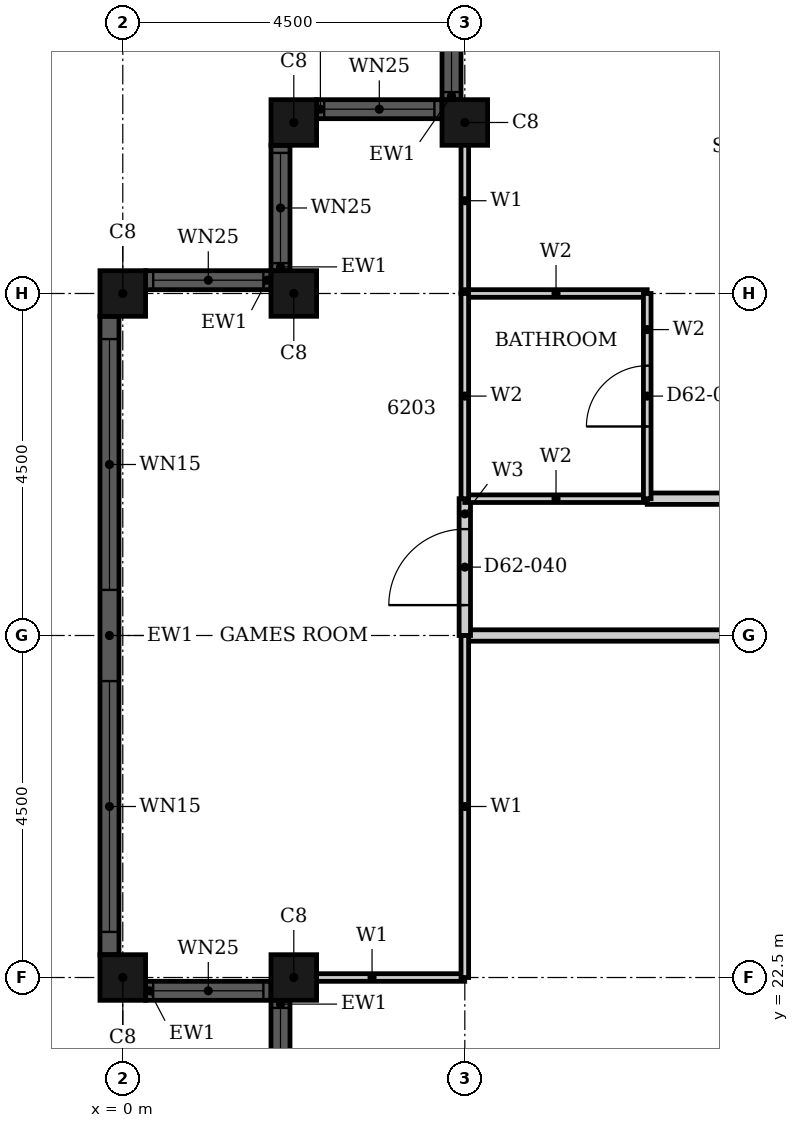
"""IFC4 building model, lengths in metres.
Left out: names, types, materials, properties, quantities, classifications, styles, units other than length and angle.
Written with IfcOpenShell. Run it as: python <this file> out.ifc"""

import sys

from ifc_helpers import new_model, si_unit, direction, frame, frame_2d, origin, origin_2d, place, context, subcontext, project, spatial, rectangle, hollow_rectangle, extrude, element, fill, save


model = new_model("IFC4")
c1 = context("Model", 3, precision=1e-05, world=origin(), true_north=direction((0.0, 1.0)))
c2 = subcontext(c1, "Body", "Model", "MODEL_VIEW")
j1 = project(units=[si_unit("LENGTHUNIT", "METRE"), si_unit("PLANEANGLEUNIT", "RADIAN")], contexts=[c1])
p1 = place(None, origin())
s1 = spatial("IfcSite", under=j1, at=p1, CompositionType="ELEMENT")
p2 = place(p1, origin())
s2 = spatial("IfcBuilding", under=s1, at=p2, CompositionType="ELEMENT")
p3 = place(p2, frame((0.0, 0.0, 245.3)))
s3 = spatial("IfcBuildingStorey", under=s2, at=p3, CompositionType="ELEMENT", Elevation=245.3)
for number, where, z_axis, x_axis in (
    (1, (4.5, 33.75, 0.0), (0.0, 0.0, 1.0), (1.0, 0.0, 0.0)),
    (2, (2.25, 33.75, 0.0), (0.0, 0.0, 1.0), (1.0, 0.0, 0.0)),
    (3, (2.25, 31.5, 0.0), (0.0, 0.0, 1.0), (1.0, 0.0, 0.0)),
    (4, (0.0, 31.5, 0.0), (0.0, 0.0, 1.0), (1.0, 0.0, 0.0)),
    (5, (0.0, 22.5, 0.0), (0.0, 0.0, 1.0), (1.0, 0.0, 0.0)),
    (6, (2.25, 22.5, 0.0), (0.0, 0.0, 1.0), (1.0, 0.0, 0.0)),
):
    element("IfcColumn", number, at=place(p3, frame(where, z_axis=z_axis, x_axis=x_axis)), inside=s3, PredefinedType="COLUMN", context=c2, shape_type="SweptSolid", body=[
        extrude(hollow_rectangle(XDim=0.6, YDim=0.6, WallThickness=0.02, at=origin_2d()), origin(), (0.0, 0.0, 1.0), 3.7),
    ])
p4 = place(p3, frame((4.325, 35.7, 0.0), z_axis=(0.0, 0.0, 1.0), x_axis=(0.0, -1.0, 0.0)))
e7 = element("IfcWall", 7, at=p4, inside=s3, PredefinedType="SOLIDWALL", context=c2, shape_type="SweptSolid", body=[
    extrude(rectangle(XDim=1.65, YDim=0.25, at=frame_2d((0.825, 0.0))), origin(), (0.0, 0.0, 1.0), 3.7),
])
p5 = place(p4, frame((0.1, 0.0, 0.9)))
e8 = element("IfcOpeningElement", 8, at=p5, cuts=e7, PredefinedType="OPENING", context=c2, shape_type="SweptSolid", body=[
    extrude(rectangle(XDim=1.45, YDim=1.85, at=frame_2d((0.725, 0.925))), frame((0.0, 0.135, 0.0), z_axis=(0.0, -1.0, 0.0), x_axis=(1.0, 0.0, 0.0)), (0.0, 0.0, 1.0), 0.27),
])
p6 = place(p3, frame((4.2, 33.925, 0.0), z_axis=(0.0, 0.0, 1.0), x_axis=(-1.0, 0.0, 0.0)))
e9 = element("IfcWall", 9, at=p6, inside=s3, PredefinedType="SOLIDWALL", context=c2, shape_type="SweptSolid", body=[
    extrude(rectangle(XDim=1.65, YDim=0.25, at=frame_2d((0.825, 0.0))), origin(), (0.0, 0.0, 1.0), 3.7),
])
p7 = place(p6, frame((0.1, 0.0, 0.9)))
e10 = element("IfcOpeningElement", 10, at=p7, cuts=e9, PredefinedType="OPENING", context=c2, shape_type="SweptSolid", body=[
    extrude(rectangle(XDim=1.45, YDim=1.85, at=frame_2d((0.725, 0.925))), frame((0.0, 0.135, 0.0), z_axis=(0.0, -1.0, 0.0), x_axis=(1.0, 0.0, 0.0)), (0.0, 0.0, 1.0), 0.27),
])
p8 = place(p3, frame((2.075, 33.45, 0.0), z_axis=(0.0, 0.0, 1.0), x_axis=(0.0, -1.0, 0.0)))
e11 = element("IfcWall", 11, at=p8, inside=s3, PredefinedType="SOLIDWALL", context=c2, shape_type="SweptSolid", body=[
    extrude(rectangle(XDim=1.65, YDim=0.25, at=frame_2d((0.825, 0.0))), origin(), (0.0, 0.0, 1.0), 3.7),
])
p9 = place(p8, frame((0.1, 0.0, 0.9)))
e12 = element("IfcOpeningElement", 12, at=p9, cuts=e11, PredefinedType="OPENING", context=c2, shape_type="SweptSolid", body=[
    extrude(rectangle(XDim=1.45, YDim=1.85, at=frame_2d((0.725, 0.925))), frame((0.0, 0.135, 0.0), z_axis=(0.0, -1.0, 0.0), x_axis=(1.0, 0.0, 0.0)), (0.0, 0.0, 1.0), 0.27),
])
p10 = place(p3, frame((1.95, 31.675, 0.0), z_axis=(0.0, 0.0, 1.0), x_axis=(-1.0, 0.0, 0.0)))
e13 = element("IfcWall", 13, at=p10, inside=s3, PredefinedType="SOLIDWALL", context=c2, shape_type="SweptSolid", body=[
    extrude(rectangle(XDim=1.65, YDim=0.25, at=frame_2d((0.825, 0.0))), origin(), (0.0, 0.0, 1.0), 3.7),
])
p11 = place(p10, frame((0.1, 0.0, 0.9)))
e14 = element("IfcOpeningElement", 14, at=p11, cuts=e13, PredefinedType="OPENING", context=c2, shape_type="SweptSolid", body=[
    extrude(rectangle(XDim=1.45, YDim=1.85, at=frame_2d((0.725, 0.925))), frame((0.0, 0.135, 0.0), z_axis=(0.0, -1.0, 0.0), x_axis=(1.0, 0.0, 0.0)), (0.0, 0.0, 1.0), 0.27),
])
p12 = place(p3, frame((-0.175, 31.2, 0.0), z_axis=(0.0, 0.0, 1.0), x_axis=(0.0, -1.0, 0.0)))
e15 = element("IfcWall", 15, at=p12, inside=s3, PredefinedType="SOLIDWALL", context=c2, shape_type="SweptSolid", body=[
    extrude(rectangle(XDim=8.4, YDim=0.25, at=frame_2d((4.2, 0.0))), origin(), (0.0, 0.0, 1.0), 3.7),
])
p13 = place(p12, frame((0.3, 0.0, 0.45)))
e16 = element("IfcOpeningElement", 16, at=p13, cuts=e15, PredefinedType="OPENING", context=c2, shape_type="SweptSolid", body=[
    extrude(rectangle(XDim=3.3, YDim=2.3, at=frame_2d((1.65, 1.15))), frame((0.0, 0.135, 0.0), z_axis=(0.0, -1.0, 0.0), x_axis=(1.0, 0.0, 0.0)), (0.0, 0.0, 1.0), 0.27),
])
p14 = place(p12, frame((4.8, 0.0, 0.45)))
e17 = element("IfcOpeningElement", 17, at=p14, cuts=e15, PredefinedType="OPENING", context=c2, shape_type="SweptSolid", body=[
    extrude(rectangle(XDim=3.3, YDim=2.3, at=frame_2d((1.65, 1.15))), frame((0.0, 0.135, 0.0), z_axis=(0.0, -1.0, 0.0), x_axis=(1.0, 0.0, 0.0)), (0.0, 0.0, 1.0), 0.27),
])
p15 = place(p3, frame((0.3, 22.325, 0.0), z_axis=(0.0, 0.0, 1.0), x_axis=(1.0, 0.0, 0.0)))
e18 = element("IfcWall", 18, at=p15, inside=s3, PredefinedType="SOLIDWALL", context=c2, shape_type="SweptSolid", body=[
    extrude(rectangle(XDim=1.65, YDim=0.25, at=frame_2d((0.825, 0.0))), origin(), (0.0, 0.0, 1.0), 3.7),
])
p16 = place(p15, frame((0.1, 0.0, 0.9)))
e19 = element("IfcOpeningElement", 19, at=p16, cuts=e18, PredefinedType="OPENING", context=c2, shape_type="SweptSolid", body=[
    extrude(rectangle(XDim=1.45, YDim=1.85, at=frame_2d((0.725, 0.925))), frame((0.0, 0.135, 0.0), z_axis=(0.0, -1.0, 0.0), x_axis=(1.0, 0.0, 0.0)), (0.0, 0.0, 1.0), 0.27),
])
p17 = place(p3, frame((2.075, 22.2, 0.0), z_axis=(0.0, 0.0, 1.0), x_axis=(0.0, -1.0, 0.0)))
e20 = element("IfcWall", 20, at=p17, inside=s3, PredefinedType="SOLIDWALL", context=c2, shape_type="SweptSolid", body=[
    extrude(rectangle(XDim=1.65, YDim=0.25, at=frame_2d((0.825, 0.0))), origin(), (0.0, 0.0, 1.0), 3.7),
])
p18 = place(p17, frame((0.1, 0.0, 0.9)))
e21 = element("IfcOpeningElement", 21, at=p18, cuts=e20, PredefinedType="OPENING", context=c2, shape_type="SweptSolid", body=[
    extrude(rectangle(XDim=1.45, YDim=1.85, at=frame_2d((0.725, 0.925))), frame((0.0, 0.135, 0.0), z_axis=(0.0, -1.0, 0.0), x_axis=(1.0, 0.0, 0.0)), (0.0, 0.0, 1.0), 0.27),
])
p19 = place(p3, frame((4.5, 27.0, 0.0), z_axis=(0.0, 0.0, 1.0), x_axis=(1.0, 0.0, 0.0)))
e22 = element("IfcWall", 22, at=p19, inside=s3, PredefinedType="PARTITIONING", context=c2, shape_type="SweptSolid", body=[
    extrude(rectangle(XDim=13.5, YDim=0.15, at=frame_2d((6.75, 0.0))), origin(), (0.0, 0.0, 1.0), 2.68),
])
p20 = place(p19, frame((5.35, 0.0, 0.0)))
e23 = element("IfcOpeningElement", 23, at=p20, cuts=e22, PredefinedType="OPENING", context=c2, shape_type="SweptSolid", body=[
    extrude(rectangle(XDim=1.0, YDim=2.1, at=frame_2d((0.5, 1.05))), frame((0.0, 0.085, 0.0), z_axis=(0.0, -1.0, 0.0), x_axis=(1.0, 0.0, 0.0)), (0.0, 0.0, 1.0), 0.17),
])
p21 = place(p3, frame((6.9, 28.8, 0.0), z_axis=(0.0, 0.0, 1.0), x_axis=(1.0, 0.0, 0.0)))
e24 = element("IfcWall", 24, at=p21, inside=s3, PredefinedType="PARTITIONING", context=c2, shape_type="SweptSolid", body=[
    extrude(rectangle(XDim=9.299, YDim=0.15, at=frame_2d((4.649, 0.0))), origin(), (0.0, 0.0, 1.0), 3.4),
])
p22 = place(p3, frame((4.5, 27.0, 0.0), z_axis=(0.0, 0.0, 1.0), x_axis=(0.0, 1.0, 0.0)))
e25 = element("IfcWall", 25, at=p22, inside=s3, PredefinedType="PARTITIONING", context=c2, shape_type="SweptSolid", body=[
    extrude(rectangle(XDim=1.8, YDim=0.15, at=frame_2d((0.9, 0.0))), origin(), (0.0, 0.0, 1.0), 3.4),
])
p23 = place(p22, frame((0.4, 0.0, 0.0)))
e26 = element("IfcOpeningElement", 26, at=p23, cuts=e25, PredefinedType="OPENING", context=c2, shape_type="SweptSolid", body=[
    extrude(rectangle(XDim=1.0, YDim=2.1, at=frame_2d((0.5, 1.05))), frame((0.0, 0.085, 0.0), z_axis=(0.0, -1.0, 0.0), x_axis=(1.0, 0.0, 0.0)), (0.0, 0.0, 1.0), 0.17),
])
p24 = place(p3, frame((2.06, 22.5, 0.0), z_axis=(0.0, 0.0, 1.0), x_axis=(1.0, 0.0, 0.0)))
e27 = element("IfcWall", 27, at=p24, inside=s3, PredefinedType="PARTITIONING", context=c2, shape_type="SweptSolid", body=[
    extrude(rectangle(XDim=2.439, YDim=0.1, at=frame_2d((1.219, 0.0))), origin(), (0.0, 0.0, 1.0), 2.68),
])
p25 = place(p3, frame((4.5, 31.501, 0.0), z_axis=(0.0, 0.0, 1.0), x_axis=(0.0, 1.0, 0.0)))
e28 = element("IfcWall", 28, at=p25, inside=s3, PredefinedType="PARTITIONING", context=c2, shape_type="SweptSolid", body=[
    extrude(rectangle(XDim=2.439, YDim=0.1, at=frame_2d((1.219, 0.0))), origin(), (0.0, 0.0, 1.0), 3.4),
])
p26 = place(p3, frame((4.5, 22.5, 0.0), z_axis=(0.0, 0.0, 1.0), x_axis=(0.0, 1.0, 0.0)))
e29 = element("IfcWall", 29, at=p26, inside=s3, PredefinedType="PARTITIONING", context=c2, shape_type="SweptSolid", body=[
    extrude(rectangle(XDim=4.5, YDim=0.1, at=frame_2d((2.25, 0.0))), origin(), (0.0, 0.0, 1.0), 3.4),
])
p27 = place(p3, frame((4.5, 28.8, 0.0), z_axis=(0.0, 0.0, 1.0), x_axis=(1.0, 0.0, 0.0)))
e30 = element("IfcWall", 30, at=p27, inside=s3, PredefinedType="PARTITIONING", context=c2, shape_type="SweptSolid", body=[
    extrude(rectangle(XDim=2.4, YDim=0.1, at=frame_2d((1.2, 0.0))), origin(), (0.0, 0.0, 1.0), 3.4),
])
p28 = place(p3, frame((4.5, 31.5, 0.0), z_axis=(0.0, 0.0, 1.0), x_axis=(1.0, 0.0, 0.0)))
e31 = element("IfcWall", 31, at=p28, inside=s3, PredefinedType="PARTITIONING", context=c2, shape_type="SweptSolid", body=[
    extrude(rectangle(XDim=2.4, YDim=0.1, at=frame_2d((1.2, 0.0))), origin(), (0.0, 0.0, 1.0), 2.68),
])
p29 = place(p3, frame((4.5, 28.8, 0.0), z_axis=(0.0, 0.0, 1.0), x_axis=(0.0, 1.0, 0.0)))
e32 = element("IfcWall", 32, at=p29, inside=s3, PredefinedType="PARTITIONING", context=c2, shape_type="SweptSolid", body=[
    extrude(rectangle(XDim=2.7, YDim=0.1, at=frame_2d((1.35, 0.0))), origin(), (0.0, 0.0, 1.0), 3.4),
])
p30 = place(p3, frame((6.9, 28.8, 0.0), z_axis=(0.0, 0.0, 1.0), x_axis=(0.0, 1.0, 0.0)))
e33 = element("IfcWall", 33, at=p30, inside=s3, PredefinedType="PARTITIONING", context=c2, shape_type="SweptSolid", body=[
    extrude(rectangle(XDim=2.7, YDim=0.1, at=frame_2d((1.35, 0.0))), origin(), (0.0, 0.0, 1.0), 3.4),
])
p31 = place(p30, frame((0.95, 0.0, 0.0)))
e34 = element("IfcOpeningElement", 34, at=p31, cuts=e33, PredefinedType="OPENING", context=c2, shape_type="SweptSolid", body=[
    extrude(rectangle(XDim=0.8, YDim=2.1, at=frame_2d((0.4, 1.05))), frame((0.0, 0.06, 0.0), z_axis=(0.0, -1.0, 0.0), x_axis=(1.0, 0.0, 0.0)), (0.0, 0.0, 1.0), 0.12),
])
p32 = place(p5, origin())
e35 = element("IfcWindow", 35, at=p32, inside=s3, PartitioningType="SINGLE_PANEL", PredefinedType="WINDOW", context=c2, shape_type="SweptSolid", body=[
    extrude(rectangle(XDim=1.45, YDim=1.85, at=frame_2d((0.725, 0.925))), frame((0.0, 0.03, 0.0), z_axis=(0.0, -1.0, 0.0), x_axis=(1.0, 0.0, 0.0)), (0.0, 0.0, 1.0), 0.06),
])
fill(e8, e35)
p33 = place(p7, origin())
e36 = element("IfcWindow", 36, at=p33, inside=s3, PartitioningType="SINGLE_PANEL", PredefinedType="WINDOW", context=c2, shape_type="SweptSolid", body=[
    extrude(rectangle(XDim=1.45, YDim=1.85, at=frame_2d((0.725, 0.925))), frame((0.0, 0.03, 0.0), z_axis=(0.0, -1.0, 0.0), x_axis=(1.0, 0.0, 0.0)), (0.0, 0.0, 1.0), 0.06),
])
fill(e10, e36)
p34 = place(p9, origin())
e37 = element("IfcWindow", 37, at=p34, inside=s3, PartitioningType="SINGLE_PANEL", PredefinedType="WINDOW", context=c2, shape_type="SweptSolid", body=[
    extrude(rectangle(XDim=1.45, YDim=1.85, at=frame_2d((0.725, 0.925))), frame((0.0, 0.03, 0.0), z_axis=(0.0, -1.0, 0.0), x_axis=(1.0, 0.0, 0.0)), (0.0, 0.0, 1.0), 0.06),
])
fill(e12, e37)
p35 = place(p11, origin())
e38 = element("IfcWindow", 38, at=p35, inside=s3, PartitioningType="SINGLE_PANEL", PredefinedType="WINDOW", context=c2, shape_type="SweptSolid", body=[
    extrude(rectangle(XDim=1.45, YDim=1.85, at=frame_2d((0.725, 0.925))), frame((0.0, 0.03, 0.0), z_axis=(0.0, -1.0, 0.0), x_axis=(1.0, 0.0, 0.0)), (0.0, 0.0, 1.0), 0.06),
])
fill(e14, e38)
p36 = place(p13, origin())
e39 = element("IfcWindow", 39, at=p36, inside=s3, PartitioningType="SINGLE_PANEL", PredefinedType="WINDOW", context=c2, shape_type="SweptSolid", body=[
    extrude(rectangle(XDim=3.3, YDim=2.3, at=frame_2d((1.65, 1.15))), frame((0.0, 0.03, 0.0), z_axis=(0.0, -1.0, 0.0), x_axis=(1.0, 0.0, 0.0)), (0.0, 0.0, 1.0), 0.06),
])
fill(e16, e39)
p37 = place(p14, origin())
e40 = element("IfcWindow", 40, at=p37, inside=s3, PartitioningType="SINGLE_PANEL", PredefinedType="WINDOW", context=c2, shape_type="SweptSolid", body=[
    extrude(rectangle(XDim=3.3, YDim=2.3, at=frame_2d((1.65, 1.15))), frame((0.0, 0.03, 0.0), z_axis=(0.0, -1.0, 0.0), x_axis=(1.0, 0.0, 0.0)), (0.0, 0.0, 1.0), 0.06),
])
fill(e17, e40)
p38 = place(p16, origin())
e41 = element("IfcWindow", 41, at=p38, inside=s3, PartitioningType="SINGLE_PANEL", PredefinedType="WINDOW", context=c2, shape_type="SweptSolid", body=[
    extrude(rectangle(XDim=1.45, YDim=1.85, at=frame_2d((0.725, 0.925))), frame((0.0, 0.03, 0.0), z_axis=(0.0, -1.0, 0.0), x_axis=(1.0, 0.0, 0.0)), (0.0, 0.0, 1.0), 0.06),
])
fill(e19, e41)
p39 = place(p18, origin())
e42 = element("IfcWindow", 42, at=p39, inside=s3, PartitioningType="SINGLE_PANEL", PredefinedType="WINDOW", context=c2, shape_type="SweptSolid", body=[
    extrude(rectangle(XDim=1.45, YDim=1.85, at=frame_2d((0.725, 0.925))), frame((0.0, 0.03, 0.0), z_axis=(0.0, -1.0, 0.0), x_axis=(1.0, 0.0, 0.0)), (0.0, 0.0, 1.0), 0.06),
])
fill(e21, e42)
p40 = place(p31, origin())
e43 = element("IfcDoor", 43, at=p40, inside=s3, OperationType="SINGLE_SWING_RIGHT", PredefinedType="DOOR", context=c2, shape_type="SweptSolid", body=[
    extrude(rectangle(XDim=0.8, YDim=2.1, at=frame_2d((0.4, 1.05))), frame((0.0, 0.025, 0.0), z_axis=(0.0, -1.0, 0.0), x_axis=(1.0, 0.0, 0.0)), (0.0, 0.0, 1.0), 0.05),
])
fill(e34, e43)
p41 = place(p23, origin())
e44 = element("IfcDoor", 44, at=p41, inside=s3, OperationType="SINGLE_SWING_RIGHT", PredefinedType="DOOR", context=c2, shape_type="SweptSolid", body=[
    extrude(rectangle(XDim=1.0, YDim=2.1, at=frame_2d((0.5, 1.05))), frame((0.0, 0.025, 0.0), z_axis=(0.0, -1.0, 0.0), x_axis=(1.0, 0.0, 0.0)), (0.0, 0.0, 1.0), 0.05),
])
fill(e26, e44)
save(model, sys.argv[1])
